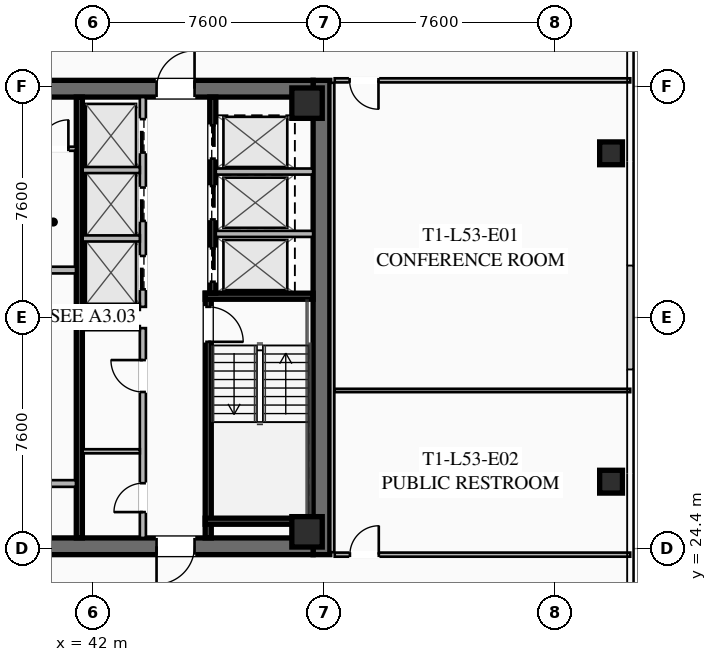
"""IFC4 building model, lengths in metres.
Left out: names, types, materials, properties, quantities, classifications, styles, units other than length and angle.
Written with IfcOpenShell. Run it as: python <this file> out.ifc"""

import sys

from ifc_helpers import new_model, si_unit, direction, frame, frame_2d, origin, origin_2d, place, context, subcontext, project, spatial, rectangle, hollow_rectangle, extrude, element, fill, save


model = new_model("IFC4")
c1 = context("Model", 3, precision=1e-05, world=origin(), true_north=direction((0.0, 1.0)))
c2 = subcontext(c1, "Body", "Model", "MODEL_VIEW")
j1 = project(units=[si_unit("LENGTHUNIT", "METRE"), si_unit("PLANEANGLEUNIT", "RADIAN")], contexts=[c1])
p1 = place(None, origin())
s1 = spatial("IfcSite", under=j1, at=p1, CompositionType="ELEMENT")
p2 = place(p1, origin())
s2 = spatial("IfcBuilding", under=s1, at=p2, CompositionType="ELEMENT")
p3 = place(p2, frame((0.0, 0.0, 196.05)))
s3 = spatial("IfcBuildingStorey", under=s2, at=p3, CompositionType="ELEMENT", Elevation=196.05)
p4 = place(p3, frame((49.525, 39.8, 0.0), z_axis=(0.0, 0.0, 1.0), x_axis=(0.0, -1.0, 0.0)))
e1 = element("IfcWall", 1, at=p4, inside=s3, PredefinedType="SHEAR", context=c2, shape_type="SweptSolid", body=[
    extrude(rectangle(XDim=15.6, YDim=0.55, at=frame_2d((7.8, 0.0))), origin(), (0.0, 0.0, 1.0), 3.55),
])
p5 = place(p3, frame((49.25, 24.475, 0.0), z_axis=(0.0, 0.0, 1.0), x_axis=(-1.0, 0.0, 0.0)))
e2 = element("IfcWall", 2, at=p5, inside=s3, PredefinedType="SHEAR", context=c2, shape_type="SweptSolid", body=[
    extrude(rectangle(XDim=14.5, YDim=0.55, at=frame_2d((7.25, 0.0))), origin(), (0.0, 0.0, 1.0), 3.55),
])
p6 = place(p5, frame((8.95, 0.0, 0.0)))
e3 = element("IfcOpeningElement", 3, at=p6, cuts=e2, PredefinedType="OPENING", context=c2, shape_type="SweptSolid", body=[
    extrude(rectangle(XDim=1.25, YDim=2.25, at=frame_2d((0.625, 1.125))), frame((0.0, 0.285, 0.0), z_axis=(0.0, -1.0, 0.0), x_axis=(1.0, 0.0, 0.0)), (0.0, 0.0, 1.0), 0.57),
])
p7 = place(p5, frame((3.9, 0.0, 0.0)))
e4 = element("IfcOpeningElement", 4, at=p7, cuts=e2, PredefinedType="OPENING", context=c2, shape_type="SweptSolid", body=[
    extrude(rectangle(XDim=1.25, YDim=2.25, at=frame_2d((0.625, 1.125))), frame((0.0, 0.285, 0.0), z_axis=(0.0, -1.0, 0.0), x_axis=(1.0, 0.0, 0.0)), (0.0, 0.0, 1.0), 0.57),
])
p8 = place(p3, frame((34.75, 39.525, 0.0), z_axis=(0.0, 0.0, 1.0), x_axis=(1.0, 0.0, 0.0)))
e5 = element("IfcWall", 5, at=p8, inside=s3, PredefinedType="SHEAR", context=c2, shape_type="SweptSolid", body=[
    extrude(rectangle(XDim=14.5, YDim=0.55, at=frame_2d((7.25, 0.0))), origin(), (0.0, 0.0, 1.0), 3.55),
])
p9 = place(p8, frame((4.3, 0.0, 0.0)))
e6 = element("IfcOpeningElement", 6, at=p9, cuts=e5, PredefinedType="OPENING", context=c2, shape_type="SweptSolid", body=[
    extrude(rectangle(XDim=1.25, YDim=2.25, at=frame_2d((0.625, 1.125))), frame((0.0, 0.285, 0.0), z_axis=(0.0, -1.0, 0.0), x_axis=(1.0, 0.0, 0.0)), (0.0, 0.0, 1.0), 0.57),
])
p10 = place(p8, frame((9.35, 0.0, 0.0)))
e7 = element("IfcOpeningElement", 7, at=p10, cuts=e5, PredefinedType="OPENING", context=c2, shape_type="SweptSolid", body=[
    extrude(rectangle(XDim=1.25, YDim=2.25, at=frame_2d((0.625, 1.125))), frame((0.0, 0.285, 0.0), z_axis=(0.0, -1.0, 0.0), x_axis=(1.0, 0.0, 0.0)), (0.0, 0.0, 1.0), 0.57),
])
for number, where, z_axis, x_axis in (
    (8, (49.05, 24.95, 0.0), (0.0, 0.0, 1.0), (1.0, 0.0, 0.0)),
    (9, (49.05, 39.05, 0.0), (0.0, 0.0, 1.0), (1.0, 0.0, 0.0)),
):
    element("IfcColumn", number, at=place(p3, frame(where, z_axis=z_axis, x_axis=x_axis)), inside=s3, PredefinedType="COLUMN", context=c2, shape_type="SweptSolid", body=[
        extrude(hollow_rectangle(XDim=1.0, YDim=1.0, WallThickness=0.04, at=origin_2d()), origin(), (0.0, 0.0, 1.0), 3.25),
    ])
for number, where, z_axis, x_axis in (
    (10, (59.05, 26.6, 0.0), (0.0, 0.0, 1.0), (1.0, 0.0, 0.0)),
    (11, (59.05, 37.4, 0.0), (0.0, 0.0, 1.0), (1.0, 0.0, 0.0)),
):
    element("IfcColumn", number, at=place(p3, frame(where, z_axis=z_axis, x_axis=x_axis)), inside=s3, PredefinedType="COLUMN", context=c2, shape_type="SweptSolid", body=[
        extrude(hollow_rectangle(XDim=0.75, YDim=0.75, WallThickness=0.032, at=origin_2d()), origin(), (0.0, 0.0, 1.0), 3.25),
    ])
p11 = place(p3, frame((45.8, 32.8, 0.0), z_axis=(0.0, 0.0, 1.0), x_axis=(0.0, -1.0, 0.0)))
e12 = element("IfcWall", 12, at=p11, inside=s3, PredefinedType="SHEAR", context=c2, shape_type="SweptSolid", body=[
    extrude(rectangle(XDim=8.05, YDim=0.2, at=frame_2d((4.025, 0.0))), origin(), (0.0, 0.0, 1.0), 3.25),
])
p12 = place(p11, frame((0.45, 0.0, 0.0)))
e13 = element("IfcOpeningElement", 13, at=p12, cuts=e12, PredefinedType="OPENING", context=c2, shape_type="SweptSolid", body=[
    extrude(rectangle(XDim=1.15, YDim=2.2, at=frame_2d((0.575, 1.1))), frame((0.0, 0.11, 0.0), z_axis=(0.0, -1.0, 0.0), x_axis=(1.0, 0.0, 0.0)), (0.0, 0.0, 1.0), 0.22),
])
for number, where, z_axis, x_axis in (
    (14, (45.7, 32.7, 0.0), (0.0, 0.0, 1.0), (1.0, 0.0, 0.0)),
    (15, (45.7, 25.3, 0.0), (0.0, 0.0, 1.0), (1.0, 0.0, 0.0)),
):
    element("IfcWall", number, at=place(p3, frame(where, z_axis=z_axis, x_axis=x_axis)), inside=s3, PredefinedType="SHEAR", context=c2, shape_type="SweptSolid", body=[
        extrude(rectangle(XDim=3.55, YDim=0.2, at=frame_2d((1.775, 0.0))), origin(), (0.0, 0.0, 1.0), 3.25),
    ])
p13 = place(p3, frame((41.56, 24.75, 0.0), z_axis=(0.0, 0.0, 1.0), x_axis=(0.0, 1.0, 0.0)))
e16 = element("IfcWall", 16, at=p13, inside=s3, PredefinedType="SHEAR", context=c2, shape_type="SweptSolid", body=[
    extrude(rectangle(XDim=14.5, YDim=0.2, at=frame_2d((7.25, 0.0))), origin(), (0.0, 0.0, 1.0), 3.25),
])
p14 = place(p3, frame((38.3, 33.56, 0.0), z_axis=(0.0, 0.0, 1.0), x_axis=(1.0, 0.0, 0.0)))
e17 = element("IfcWall", 17, at=p14, inside=s3, PredefinedType="SOLIDWALL", context=c2, shape_type="SweptSolid", body=[
    extrude(rectangle(XDim=3.15, YDim=0.22, at=frame_2d((1.575, 0.0))), origin(), (0.0, 0.0, 1.0), 2.393),
])
p15 = place(p3, frame((38.3, 26.54, 0.0), z_axis=(0.0, 0.0, 1.0), x_axis=(1.0, 0.0, 0.0)))
e18 = element("IfcWall", 18, at=p15, inside=s3, PredefinedType="SOLIDWALL", context=c2, shape_type="SweptSolid", body=[
    extrude(rectangle(XDim=3.15, YDim=0.22, at=frame_2d((1.575, 0.0))), origin(), (0.0, 0.0, 1.0), 2.393),
])
p16 = place(p15, frame((0.95, 0.0, 0.0)))
e19 = element("IfcOpeningElement", 19, at=p16, cuts=e18, PredefinedType="OPENING", context=c2, shape_type="SweptSolid", body=[
    extrude(rectangle(XDim=1.25, YDim=2.25, at=frame_2d((0.625, 1.125))), frame((0.0, 0.12, 0.0), z_axis=(0.0, -1.0, 0.0), x_axis=(1.0, 0.0, 0.0)), (0.0, 0.0, 1.0), 0.24),
])
p17 = place(p3, frame((45.95, 39.25, 0.0), z_axis=(0.0, 0.0, 1.0), x_axis=(0.0, -1.0, 0.0)))
e20 = element("IfcWall", 20, at=p17, inside=s3, PredefinedType="SHEAR", context=c2, shape_type="SweptSolid", body=[
    extrude(rectangle(XDim=6.45, YDim=0.2, at=frame_2d((3.225, 0.0))), origin(), (0.0, 0.0, 1.0), 3.25),
])
p18 = place(p17, frame((4.975, 0.0, 0.0)))
e21 = element("IfcOpeningElement", 21, at=p18, cuts=e20, PredefinedType="OPENING", context=c2, shape_type="SweptSolid", body=[
    extrude(rectangle(XDim=1.1, YDim=2.2, at=frame_2d((0.55, 1.1))), frame((0.0, 0.11, 0.0), z_axis=(0.0, -1.0, 0.0), x_axis=(1.0, 0.0, 0.0)), (0.0, 0.0, 1.0), 0.22),
])
p19 = place(p17, frame((2.925, 0.0, 0.0)))
e22 = element("IfcOpeningElement", 22, at=p19, cuts=e20, PredefinedType="OPENING", context=c2, shape_type="SweptSolid", body=[
    extrude(rectangle(XDim=1.1, YDim=2.2, at=frame_2d((0.55, 1.1))), frame((0.0, 0.11, 0.0), z_axis=(0.0, -1.0, 0.0), x_axis=(1.0, 0.0, 0.0)), (0.0, 0.0, 1.0), 0.22),
])
p20 = place(p17, frame((0.925, 0.0, 0.0)))
e23 = element("IfcOpeningElement", 23, at=p20, cuts=e20, PredefinedType="OPENING", context=c2, shape_type="SweptSolid", body=[
    extrude(rectangle(XDim=1.1, YDim=2.2, at=frame_2d((0.55, 1.1))), frame((0.0, 0.11, 0.0), z_axis=(0.0, -1.0, 0.0), x_axis=(1.0, 0.0, 0.0)), (0.0, 0.0, 1.0), 0.22),
])
for number, where, z_axis, x_axis in (
    (24, (46.05, 34.75, 0.0), (0.0, 0.0, 1.0), (1.0, 0.0, 0.0)),
    (25, (46.05, 36.8, 0.0), (0.0, 0.0, 1.0), (1.0, 0.0, 0.0)),
):
    element("IfcWall", number, at=place(p3, frame(where, z_axis=z_axis, x_axis=x_axis)), inside=s3, PredefinedType="SOLIDWALL", context=c2, shape_type="SweptSolid", body=[
        extrude(rectangle(XDim=3.2, YDim=0.2, at=frame_2d((1.6, 0.0))), origin(), (0.0, 0.0, 1.0), 3.25),
    ])
p21 = place(p3, frame((38.3, 37.55, 0.0), z_axis=(0.0, 0.0, 1.0), x_axis=(1.0, 0.0, 0.0)))
e26 = element("IfcWall", 26, at=p21, inside=s3, PredefinedType="PARTITIONING", context=c2, shape_type="SweptSolid", body=[
    extrude(rectangle(XDim=3.15, YDim=0.135, at=frame_2d((1.575, 0.0))), origin(), (0.0, 0.0, 1.0), 2.393),
])
p22 = place(p21, frame((0.25, 0.0, 0.0)))
e27 = element("IfcOpeningElement", 27, at=p22, cuts=e26, PredefinedType="OPENING", context=c2, shape_type="SweptSolid", body=[
    extrude(rectangle(XDim=0.95, YDim=2.05, at=frame_2d((0.475, 1.025))), frame((0.0, 0.077, 0.0), z_axis=(0.0, -1.0, 0.0), x_axis=(1.0, 0.0, 0.0)), (0.0, 0.0, 1.0), 0.155),
])
p23 = place(p21, frame((1.95, 0.0, 0.0)))
e28 = element("IfcOpeningElement", 28, at=p23, cuts=e26, PredefinedType="OPENING", context=c2, shape_type="SweptSolid", body=[
    extrude(rectangle(XDim=0.95, YDim=2.05, at=frame_2d((0.475, 1.025))), frame((0.0, 0.077, 0.0), z_axis=(0.0, -1.0, 0.0), x_axis=(1.0, 0.0, 0.0)), (0.0, 0.0, 1.0), 0.155),
])
p24 = place(p3, frame((43.65, 24.75, 0.0), z_axis=(0.0, 0.0, 1.0), x_axis=(0.0, 1.0, 0.0)))
e29 = element("IfcWall", 29, at=p24, inside=s3, PredefinedType="SOLIDWALL", context=c2, shape_type="SweptSolid", body=[
    extrude(rectangle(XDim=6.9, YDim=0.2, at=frame_2d((3.45, 0.0))), origin(), (0.0, 0.0, 1.0), 2.393),
])
p25 = place(p24, frame((0.85, 0.0, 0.0)))
e30 = element("IfcOpeningElement", 30, at=p25, cuts=e29, PredefinedType="OPENING", context=c2, shape_type="SweptSolid", body=[
    extrude(rectangle(XDim=0.95, YDim=2.05, at=frame_2d((0.475, 1.025))), frame((0.0, 0.11, 0.0), z_axis=(0.0, -1.0, 0.0), x_axis=(1.0, 0.0, 0.0)), (0.0, 0.0, 1.0), 0.22),
])
p26 = place(p24, frame((4.8, 0.0, 0.0)))
e31 = element("IfcOpeningElement", 31, at=p26, cuts=e29, PredefinedType="OPENING", context=c2, shape_type="SweptSolid", body=[
    extrude(rectangle(XDim=1.05, YDim=2.2, at=frame_2d((0.525, 1.1))), frame((0.0, 0.11, 0.0), z_axis=(0.0, -1.0, 0.0), x_axis=(1.0, 0.0, 0.0)), (0.0, 0.0, 1.0), 0.22),
])
for number, where, z_axis, x_axis in (
    (32, (41.67, 31.65, 0.0), (0.0, 0.0, 1.0), (1.0, 0.0, 0.0)),
    (33, (41.67, 27.6, 0.0), (0.0, 0.0, 1.0), (1.0, 0.0, 0.0)),
):
    element("IfcWall", number, at=place(p3, frame(where, z_axis=z_axis, x_axis=x_axis)), inside=s3, PredefinedType="PARTITIONING", context=c2, shape_type="SweptSolid", body=[
        extrude(rectangle(XDim=1.88, YDim=0.135, at=frame_2d((0.94, 0.0))), origin(), (0.0, 0.0, 1.0), 2.393),
    ])
p27 = place(p3, frame((43.65, 32.35, 0.0), z_axis=(0.0, 0.0, 1.0), x_axis=(0.0, 1.0, 0.0)))
e34 = element("IfcWall", 34, at=p27, inside=s3, PredefinedType="SOLIDWALL", context=c2, shape_type="SweptSolid", body=[
    extrude(rectangle(XDim=6.9, YDim=0.2, at=frame_2d((3.45, 0.0))), origin(), (0.0, 0.0, 1.0), 3.25),
])
p28 = place(p27, frame((0.575, 0.0, 0.0)))
e35 = element("IfcOpeningElement", 35, at=p28, cuts=e34, PredefinedType="OPENING", context=c2, shape_type="SweptSolid", body=[
    extrude(rectangle(XDim=1.1, YDim=2.2, at=frame_2d((0.55, 1.1))), frame((0.0, 0.11, 0.0), z_axis=(0.0, -1.0, 0.0), x_axis=(1.0, 0.0, 0.0)), (0.0, 0.0, 1.0), 0.22),
])
p29 = place(p27, frame((2.825, 0.0, 0.0)))
e36 = element("IfcOpeningElement", 36, at=p29, cuts=e34, PredefinedType="OPENING", context=c2, shape_type="SweptSolid", body=[
    extrude(rectangle(XDim=1.1, YDim=2.2, at=frame_2d((0.55, 1.1))), frame((0.0, 0.11, 0.0), z_axis=(0.0, -1.0, 0.0), x_axis=(1.0, 0.0, 0.0)), (0.0, 0.0, 1.0), 0.22),
])
p30 = place(p27, frame((5.075, 0.0, 0.0)))
e37 = element("IfcOpeningElement", 37, at=p30, cuts=e34, PredefinedType="OPENING", context=c2, shape_type="SweptSolid", body=[
    extrude(rectangle(XDim=1.1, YDim=2.2, at=frame_2d((0.55, 1.1))), frame((0.0, 0.11, 0.0), z_axis=(0.0, -1.0, 0.0), x_axis=(1.0, 0.0, 0.0)), (0.0, 0.0, 1.0), 0.22),
])
for number, where, z_axis, x_axis in (
    (38, (41.67, 32.35, 0.0), (0.0, 0.0, 1.0), (1.0, 0.0, 0.0)),
    (39, (41.67, 34.6, 0.0), (0.0, 0.0, 1.0), (1.0, 0.0, 0.0)),
    (40, (41.67, 36.85, 0.0), (0.0, 0.0, 1.0), (1.0, 0.0, 0.0)),
):
    element("IfcWall", number, at=place(p3, frame(where, z_axis=z_axis, x_axis=x_axis)), inside=s3, PredefinedType="SOLIDWALL", context=c2, shape_type="SweptSolid", body=[
        extrude(rectangle(XDim=1.88, YDim=0.2, at=frame_2d((0.94, 0.0))), origin(), (0.0, 0.0, 1.0), 3.25),
    ])
p31 = place(p3, frame((49.88, 39.72, 0.0), z_axis=(0.0, 0.0, 1.0), x_axis=(0.0, -1.0, 0.0)))
e41 = element("IfcWall", 41, at=p31, inside=s3, PredefinedType="PARTITIONING", context=c2, shape_type="SweptSolid", body=[
    extrude(rectangle(XDim=15.44, YDim=0.135, at=frame_2d((7.72, 0.0))), origin(), (0.0, 0.0, 1.0), 2.393),
])
p32 = place(p3, frame((59.68, 39.8, 0.0), z_axis=(0.0, 0.0, 1.0), x_axis=(-1.0, 0.0, 0.0)))
e42 = element("IfcWall", 42, at=p32, inside=s3, PredefinedType="PARTITIONING", context=c2, shape_type="SweptSolid", body=[
    extrude(rectangle(XDim=9.72, YDim=0.135, at=frame_2d((4.86, 0.0))), origin(), (0.0, 0.0, 1.0), 2.393),
])
p33 = place(p32, frame((8.28, 0.0, 0.0)))
e43 = element("IfcOpeningElement", 43, at=p33, cuts=e42, PredefinedType="OPENING", context=c2, shape_type="SweptSolid", body=[
    extrude(rectangle(XDim=0.95, YDim=2.05, at=frame_2d((0.475, 1.025))), frame((0.0, 0.077, 0.0), z_axis=(0.0, -1.0, 0.0), x_axis=(1.0, 0.0, 0.0)), (0.0, 0.0, 1.0), 0.155),
])
p34 = place(p3, frame((49.96, 24.2, 0.0), z_axis=(0.0, 0.0, 1.0), x_axis=(1.0, 0.0, 0.0)))
e44 = element("IfcWall", 44, at=p34, inside=s3, PredefinedType="PARTITIONING", context=c2, shape_type="SweptSolid", body=[
    extrude(rectangle(XDim=9.72, YDim=0.135, at=frame_2d((4.86, 0.0))), origin(), (0.0, 0.0, 1.0), 2.393),
])
p35 = place(p34, frame((0.5, 0.0, 0.0)))
e45 = element("IfcOpeningElement", 45, at=p35, cuts=e44, PredefinedType="OPENING", context=c2, shape_type="SweptSolid", body=[
    extrude(rectangle(XDim=0.95, YDim=2.05, at=frame_2d((0.475, 1.025))), frame((0.0, 0.077, 0.0), z_axis=(0.0, -1.0, 0.0), x_axis=(1.0, 0.0, 0.0)), (0.0, 0.0, 1.0), 0.155),
])
p36 = place(p3, frame((49.96, 29.6, 0.0), z_axis=(0.0, 0.0, 1.0), x_axis=(1.0, 0.0, 0.0)))
e46 = element("IfcWall", 46, at=p36, inside=s3, PredefinedType="PARTITIONING", context=c2, shape_type="SweptSolid", body=[
    extrude(rectangle(XDim=9.72, YDim=0.11, at=frame_2d((4.86, 0.0))), origin(), (0.0, 0.0, 1.0), 2.393),
])
p37 = place(p10, origin())
e47 = element("IfcDoor", 47, at=p37, inside=s3, OperationType="SINGLE_SWING_RIGHT", PredefinedType="DOOR", context=c2, shape_type="SweptSolid", body=[
    extrude(rectangle(XDim=1.25, YDim=2.25, at=frame_2d((0.625, 1.125))), frame((0.0, 0.025, 0.0), z_axis=(0.0, -1.0, 0.0), x_axis=(1.0, 0.0, 0.0)), (0.0, 0.0, 1.0), 0.05),
])
fill(e7, e47)
p38 = place(p7, origin())
e48 = element("IfcDoor", 48, at=p38, inside=s3, OperationType="SINGLE_SWING_RIGHT", PredefinedType="DOOR", context=c2, shape_type="SweptSolid", body=[
    extrude(rectangle(XDim=1.25, YDim=2.25, at=frame_2d((0.625, 1.125))), frame((0.0, 0.025, 0.0), z_axis=(0.0, -1.0, 0.0), x_axis=(1.0, 0.0, 0.0)), (0.0, 0.0, 1.0), 0.05),
])
fill(e4, e48)
p39 = place(p12, origin())
e49 = element("IfcDoor", 49, at=p39, inside=s3, OperationType="SINGLE_SWING_RIGHT", PredefinedType="DOOR", context=c2, shape_type="SweptSolid", body=[
    extrude(rectangle(XDim=1.15, YDim=2.2, at=frame_2d((0.575, 1.1))), frame((0.0, 0.025, 0.0), z_axis=(0.0, -1.0, 0.0), x_axis=(1.0, 0.0, 0.0)), (0.0, 0.0, 1.0), 0.05),
])
fill(e13, e49)
p40 = place(p23, origin())
e50 = element("IfcDoor", 50, at=p40, inside=s3, OperationType="SINGLE_SWING_RIGHT", PredefinedType="DOOR", context=c2, shape_type="SweptSolid", body=[
    extrude(rectangle(XDim=0.95, YDim=2.05, at=frame_2d((0.475, 1.025))), frame((0.0, 0.025, 0.0), z_axis=(0.0, -1.0, 0.0), x_axis=(1.0, 0.0, 0.0)), (0.0, 0.0, 1.0), 0.05),
])
fill(e28, e50)
p41 = place(p25, origin())
e51 = element("IfcDoor", 51, at=p41, inside=s3, OperationType="SINGLE_SWING_LEFT", PredefinedType="DOOR", context=c2, shape_type="SweptSolid", body=[
    extrude(rectangle(XDim=0.95, YDim=2.05, at=frame_2d((0.475, 1.025))), frame((0.0, 0.025, 0.0), z_axis=(0.0, -1.0, 0.0), x_axis=(1.0, 0.0, 0.0)), (0.0, 0.0, 1.0), 0.05),
])
fill(e30, e51)
p42 = place(p26, origin())
e52 = element("IfcDoor", 52, at=p42, inside=s3, OperationType="SINGLE_SWING_RIGHT", PredefinedType="DOOR", context=c2, shape_type="SweptSolid", body=[
    extrude(rectangle(XDim=1.05, YDim=2.2, at=frame_2d((0.525, 1.1))), frame((0.0, 0.025, 0.0), z_axis=(0.0, -1.0, 0.0), x_axis=(1.0, 0.0, 0.0)), (0.0, 0.0, 1.0), 0.05),
])
fill(e31, e52)
p43 = place(p33, origin())
e53 = element("IfcDoor", 53, at=p43, inside=s3, OperationType="SINGLE_SWING_LEFT", PredefinedType="DOOR", context=c2, shape_type="SweptSolid", body=[
    extrude(rectangle(XDim=0.95, YDim=2.05, at=frame_2d((0.475, 1.025))), frame((0.0, 0.025, 0.0), z_axis=(0.0, -1.0, 0.0), x_axis=(1.0, 0.0, 0.0)), (0.0, 0.0, 1.0), 0.05),
])
fill(e43, e53)
p44 = place(p35, origin())
e54 = element("IfcDoor", 54, at=p44, inside=s3, OperationType="SINGLE_SWING_RIGHT", PredefinedType="DOOR", context=c2, shape_type="SweptSolid", body=[
    extrude(rectangle(XDim=0.95, YDim=2.05, at=frame_2d((0.475, 1.025))), frame((0.0, 0.025, 0.0), z_axis=(0.0, -1.0, 0.0), x_axis=(1.0, 0.0, 0.0)), (0.0, 0.0, 1.0), 0.05),
])
fill(e45, e54)
p45 = place(p28, origin())
e55 = element("IfcDoor", 55, at=p45, inside=s3, OperationType="SLIDING_TO_LEFT", PredefinedType="DOOR", context=c2, shape_type="SweptSolid", body=[
    extrude(rectangle(XDim=1.1, YDim=2.2, at=frame_2d((0.55, 1.1))), frame((0.0, 0.025, 0.0), z_axis=(0.0, -1.0, 0.0), x_axis=(1.0, 0.0, 0.0)), (0.0, 0.0, 1.0), 0.05),
])
fill(e35, e55)
p46 = place(p29, origin())
e56 = element("IfcDoor", 56, at=p46, inside=s3, OperationType="SLIDING_TO_LEFT", PredefinedType="DOOR", context=c2, shape_type="SweptSolid", body=[
    extrude(rectangle(XDim=1.1, YDim=2.2, at=frame_2d((0.55, 1.1))), frame((0.0, 0.025, 0.0), z_axis=(0.0, -1.0, 0.0), x_axis=(1.0, 0.0, 0.0)), (0.0, 0.0, 1.0), 0.05),
])
fill(e36, e56)
p47 = place(p30, origin())
e57 = element("IfcDoor", 57, at=p47, inside=s3, OperationType="SLIDING_TO_LEFT", PredefinedType="DOOR", context=c2, shape_type="SweptSolid", body=[
    extrude(rectangle(XDim=1.1, YDim=2.2, at=frame_2d((0.55, 1.1))), frame((0.0, 0.025, 0.0), z_axis=(0.0, -1.0, 0.0), x_axis=(1.0, 0.0, 0.0)), (0.0, 0.0, 1.0), 0.05),
])
fill(e37, e57)
p48 = place(p18, origin())
e58 = element("IfcDoor", 58, at=p48, inside=s3, OperationType="SLIDING_TO_LEFT", PredefinedType="DOOR", context=c2, shape_type="SweptSolid", body=[
    extrude(rectangle(XDim=1.1, YDim=2.2, at=frame_2d((0.55, 1.1))), frame((0.0, 0.025, 0.0), z_axis=(0.0, -1.0, 0.0), x_axis=(1.0, 0.0, 0.0)), (0.0, 0.0, 1.0), 0.05),
])
fill(e21, e58)
p49 = place(p19, origin())
e59 = element("IfcDoor", 59, at=p49, inside=s3, OperationType="SLIDING_TO_LEFT", PredefinedType="DOOR", context=c2, shape_type="SweptSolid", body=[
    extrude(rectangle(XDim=1.1, YDim=2.2, at=frame_2d((0.55, 1.1))), frame((0.0, 0.025, 0.0), z_axis=(0.0, -1.0, 0.0), x_axis=(1.0, 0.0, 0.0)), (0.0, 0.0, 1.0), 0.05),
])
fill(e22, e59)
p50 = place(p20, origin())
e60 = element("IfcDoor", 60, at=p50, inside=s3, OperationType="SLIDING_TO_LEFT", PredefinedType="DOOR", context=c2, shape_type="SweptSolid", body=[
    extrude(rectangle(XDim=1.1, YDim=2.2, at=frame_2d((0.55, 1.1))), frame((0.0, 0.025, 0.0), z_axis=(0.0, -1.0, 0.0), x_axis=(1.0, 0.0, 0.0)), (0.0, 0.0, 1.0), 0.05),
])
fill(e23, e60)
save(model, sys.argv[1])
